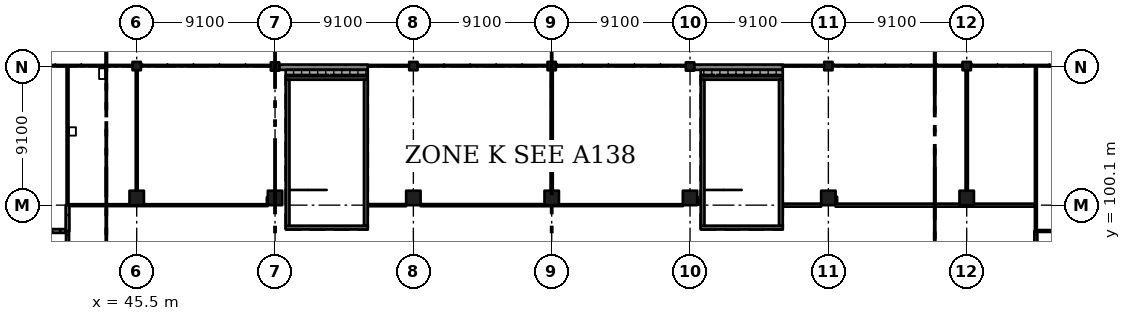
"""IFC4 building model, lengths in metres.
Left out: names, types, materials, properties, quantities, classifications, styles, units other than length and angle.
Written with IfcOpenShell. Run it as: python <this file> out.ifc"""

import sys

from ifc_helpers import new_model, si_unit, direction, frame, frame_2d, origin, origin_2d, place, context, subcontext, project, spatial, rectangle, extrude, element, fill, save


model = new_model("IFC4")
c1 = context("Model", 3, precision=1e-05, world=origin(), true_north=direction((0.0, 1.0)))
c2 = subcontext(c1, "Body", "Model", "MODEL_VIEW")
j1 = project(units=[si_unit("LENGTHUNIT", "METRE"), si_unit("PLANEANGLEUNIT", "RADIAN")], contexts=[c1])
p1 = place(None, origin())
s1 = spatial("IfcSite", under=j1, at=p1, CompositionType="ELEMENT")
p2 = place(p1, origin())
s2 = spatial("IfcBuilding", under=s1, at=p2, CompositionType="ELEMENT")
p3 = place(p2, frame((0.0, 0.0, 10.92)))
s3 = spatial("IfcBuildingStorey", under=s2, at=p3, CompositionType="ELEMENT", Elevation=10.92)
p4 = place(p3, frame((45.5, 100.575, 0.0), z_axis=(0.0, 0.0, 1.0), x_axis=(1.0, 0.0, 0.0)))
e1 = element("IfcColumn", 1, at=p4, inside=s3, PredefinedType="COLUMN", context=c2, shape_type="SweptSolid", body=[
    extrude(rectangle(XDim=0.95, YDim=0.95, at=origin_2d()), origin(), (0.0, 0.0, 1.0), 4.55),
])
p5 = place(p3, frame((45.5, 109.25, 0.0), z_axis=(0.0, 0.0, 1.0), x_axis=(1.0, 0.0, 0.0)))
e2 = element("IfcColumn", 2, at=p5, inside=s3, PredefinedType="COLUMN", context=c2, shape_type="SweptSolid", body=[
    extrude(rectangle(XDim=0.55, YDim=0.55, at=origin_2d()), origin(), (0.0, 0.0, 1.0), 4.55),
])
p6 = place(p3, frame((54.6, 100.575, 0.0), z_axis=(0.0, 0.0, 1.0), x_axis=(1.0, 0.0, 0.0)))
e3 = element("IfcColumn", 3, at=p6, inside=s3, PredefinedType="COLUMN", context=c2, shape_type="SweptSolid", body=[
    extrude(rectangle(XDim=0.95, YDim=0.95, at=origin_2d()), origin(), (0.0, 0.0, 1.0), 4.55),
])
p7 = place(p3, frame((54.6, 109.225, 0.0), z_axis=(0.0, 0.0, 1.0), x_axis=(1.0, 0.0, 0.0)))
e4 = element("IfcColumn", 4, at=p7, inside=s3, PredefinedType="COLUMN", context=c2, shape_type="SweptSolid", body=[
    extrude(rectangle(XDim=0.55, YDim=0.55, at=origin_2d()), origin(), (0.0, 0.0, 1.0), 4.55),
])
p8 = place(p3, frame((63.7, 100.575, 0.0), z_axis=(0.0, 0.0, 1.0), x_axis=(1.0, 0.0, 0.0)))
e5 = element("IfcColumn", 5, at=p8, inside=s3, PredefinedType="COLUMN", context=c2, shape_type="SweptSolid", body=[
    extrude(rectangle(XDim=0.95, YDim=0.95, at=origin_2d()), origin(), (0.0, 0.0, 1.0), 4.55),
])
p9 = place(p3, frame((63.7, 109.25, 0.0), z_axis=(0.0, 0.0, 1.0), x_axis=(1.0, 0.0, 0.0)))
e6 = element("IfcColumn", 6, at=p9, inside=s3, PredefinedType="COLUMN", context=c2, shape_type="SweptSolid", body=[
    extrude(rectangle(XDim=0.55, YDim=0.55, at=origin_2d()), origin(), (0.0, 0.0, 1.0), 4.55),
])
p10 = place(p3, frame((72.8, 100.575, 0.0), z_axis=(0.0, 0.0, 1.0), x_axis=(1.0, 0.0, 0.0)))
e7 = element("IfcColumn", 7, at=p10, inside=s3, PredefinedType="COLUMN", context=c2, shape_type="SweptSolid", body=[
    extrude(rectangle(XDim=0.95, YDim=0.95, at=origin_2d()), origin(), (0.0, 0.0, 1.0), 4.55),
])
p11 = place(p3, frame((72.8, 109.25, 0.0), z_axis=(0.0, 0.0, 1.0), x_axis=(1.0, 0.0, 0.0)))
e8 = element("IfcColumn", 8, at=p11, inside=s3, PredefinedType="COLUMN", context=c2, shape_type="SweptSolid", body=[
    extrude(rectangle(XDim=0.55, YDim=0.55, at=origin_2d()), origin(), (0.0, 0.0, 1.0), 4.55),
])
p12 = place(p3, frame((81.9, 100.575, 0.0), z_axis=(0.0, 0.0, 1.0), x_axis=(1.0, 0.0, 0.0)))
e9 = element("IfcColumn", 9, at=p12, inside=s3, PredefinedType="COLUMN", context=c2, shape_type="SweptSolid", body=[
    extrude(rectangle(XDim=0.95, YDim=0.95, at=origin_2d()), origin(), (0.0, 0.0, 1.0), 4.55),
])
p13 = place(p3, frame((81.9, 109.225, 0.0), z_axis=(0.0, 0.0, 1.0), x_axis=(1.0, 0.0, 0.0)))
e10 = element("IfcColumn", 10, at=p13, inside=s3, PredefinedType="COLUMN", context=c2, shape_type="SweptSolid", body=[
    extrude(rectangle(XDim=0.55, YDim=0.55, at=origin_2d()), origin(), (0.0, 0.0, 1.0), 4.55),
])
p14 = place(p3, frame((91.0, 100.575, 0.0), z_axis=(0.0, 0.0, 1.0), x_axis=(1.0, 0.0, 0.0)))
e11 = element("IfcColumn", 11, at=p14, inside=s3, PredefinedType="COLUMN", context=c2, shape_type="SweptSolid", body=[
    extrude(rectangle(XDim=0.95, YDim=0.95, at=origin_2d()), origin(), (0.0, 0.0, 1.0), 4.55),
])
p15 = place(p3, frame((91.0, 109.25, 0.0), z_axis=(0.0, 0.0, 1.0), x_axis=(1.0, 0.0, 0.0)))
e12 = element("IfcColumn", 12, at=p15, inside=s3, PredefinedType="COLUMN", context=c2, shape_type="SweptSolid", body=[
    extrude(rectangle(XDim=0.55, YDim=0.55, at=origin_2d()), origin(), (0.0, 0.0, 1.0), 4.55),
])
p16 = place(p3, frame((100.1, 100.575, 0.0), z_axis=(0.0, 0.0, 1.0), x_axis=(1.0, 0.0, 0.0)))
e13 = element("IfcColumn", 13, at=p16, inside=s3, PredefinedType="COLUMN", context=c2, shape_type="SweptSolid", body=[
    extrude(rectangle(XDim=0.95, YDim=0.95, at=origin_2d()), origin(), (0.0, 0.0, 1.0), 4.55),
])
p17 = place(p3, frame((100.1, 109.25, 0.0), z_axis=(0.0, 0.0, 1.0), x_axis=(1.0, 0.0, 0.0)))
e14 = element("IfcColumn", 14, at=p17, inside=s3, PredefinedType="COLUMN", context=c2, shape_type="SweptSolid", body=[
    extrude(rectangle(XDim=0.55, YDim=0.55, at=origin_2d()), origin(), (0.0, 0.0, 1.0), 4.55),
])
p18 = place(p3, frame((60.7, 98.625, 0.0), z_axis=(0.0, 0.0, 1.0), x_axis=(-1.0, 0.0, 0.0)))
e15 = element("IfcWall", 15, at=p18, inside=s3, PredefinedType="SHEAR", context=c2, shape_type="SweptSolid", body=[
    extrude(rectangle(XDim=5.4, YDim=0.25, at=frame_2d((2.7, 0.0))), origin(), (0.0, 0.0, 1.0), 4.55),
])
p19 = place(p18, frame((1.5, 0.0, 0.0)))
e16 = element("IfcOpeningElement", 16, at=p19, cuts=e15, PredefinedType="OPENING", context=c2, shape_type="SweptSolid", body=[
    extrude(rectangle(XDim=2.4, YDim=2.1, at=frame_2d((1.2, 1.05))), frame((0.0, 0.135, 0.0), z_axis=(0.0, -1.0, 0.0), x_axis=(1.0, 0.0, 0.0)), (0.0, 0.0, 1.0), 0.27),
])
p20 = place(p3, frame((60.7, 108.475, 0.0), z_axis=(0.0, 0.0, 1.0), x_axis=(-1.0, 0.0, 0.0)))
e17 = element("IfcWall", 17, at=p20, inside=s3, PredefinedType="SHEAR", context=c2, shape_type="SweptSolid", body=[
    extrude(rectangle(XDim=5.4, YDim=0.25, at=frame_2d((2.7, 0.0))), origin(), (0.0, 0.0, 1.0), 4.55),
])
for number, where, z_axis, x_axis in (
    (18, (55.425, 108.35, 0.0), (0.0, 0.0, 1.0), (0.0, -1.0, 0.0)),
    (19, (60.575, 108.35, 0.0), (0.0, 0.0, 1.0), (0.0, -1.0, 0.0)),
):
    element("IfcWall", number, at=place(p3, frame(where, z_axis=z_axis, x_axis=x_axis)), inside=s3, PredefinedType="SHEAR", context=c2, shape_type="SweptSolid", body=[
        extrude(rectangle(XDim=9.6, YDim=0.25, at=frame_2d((4.8, 0.0))), origin(), (0.0, 0.0, 1.0), 4.55),
    ])
p21 = place(p3, frame((88.0, 98.625, 0.0), z_axis=(0.0, 0.0, 1.0), x_axis=(-1.0, 0.0, 0.0)))
e20 = element("IfcWall", 20, at=p21, inside=s3, PredefinedType="SHEAR", context=c2, shape_type="SweptSolid", body=[
    extrude(rectangle(XDim=5.4, YDim=0.25, at=frame_2d((2.7, 0.0))), origin(), (0.0, 0.0, 1.0), 4.55),
])
p22 = place(p21, frame((1.5, 0.0, 0.0)))
e21 = element("IfcOpeningElement", 21, at=p22, cuts=e20, PredefinedType="OPENING", context=c2, shape_type="SweptSolid", body=[
    extrude(rectangle(XDim=2.4, YDim=2.1, at=frame_2d((1.2, 1.05))), frame((0.0, 0.135, 0.0), z_axis=(0.0, -1.0, 0.0), x_axis=(1.0, 0.0, 0.0)), (0.0, 0.0, 1.0), 0.27),
])
p23 = place(p3, frame((88.0, 108.475, 0.0), z_axis=(0.0, 0.0, 1.0), x_axis=(-1.0, 0.0, 0.0)))
e22 = element("IfcWall", 22, at=p23, inside=s3, PredefinedType="SHEAR", context=c2, shape_type="SweptSolid", body=[
    extrude(rectangle(XDim=5.4, YDim=0.25, at=frame_2d((2.7, 0.0))), origin(), (0.0, 0.0, 1.0), 4.55),
])
for number, where, z_axis, x_axis in (
    (23, (82.725, 108.35, 0.0), (0.0, 0.0, 1.0), (0.0, -1.0, 0.0)),
    (24, (87.875, 108.35, 0.0), (0.0, 0.0, 1.0), (0.0, -1.0, 0.0)),
):
    element("IfcWall", number, at=place(p3, frame(where, z_axis=z_axis, x_axis=x_axis)), inside=s3, PredefinedType="SHEAR", context=c2, shape_type="SweptSolid", body=[
        extrude(rectangle(XDim=9.6, YDim=0.25, at=frame_2d((4.8, 0.0))), origin(), (0.0, 0.0, 1.0), 4.55),
    ])
for number, where, z_axis, x_axis in (
    (25, (88.0, 109.175, 0.0), (0.0, 0.0, 1.0), (-1.0, 0.0, 0.0)),
    (26, (60.7, 109.175, 0.0), (0.0, 0.0, 1.0), (-1.0, 0.0, 0.0)),
):
    element("IfcWall", number, at=place(p3, frame(where, z_axis=z_axis, x_axis=x_axis)), inside=s3, PredefinedType="SOLIDWALL", context=c2, shape_type="SweptSolid", body=[
        extrude(rectangle(XDim=5.825, YDim=0.35, at=frame_2d((2.913, 0.0))), origin(), (0.0, 0.0, 1.0), 3.5),
    ])
for number, where, z_axis, x_axis in (
    (27, (55.3, 108.8, 0.0), (0.0, 0.0, 1.0), (1.0, 0.0, 0.0)),
    (28, (82.6, 108.8, 0.0), (0.0, 0.0, 1.0), (1.0, 0.0, 0.0)),
):
    element("IfcWall", number, at=place(p3, frame(where, z_axis=z_axis, x_axis=x_axis)), inside=s3, PredefinedType="SOLIDWALL", context=c2, shape_type="SweptSolid", body=[
        extrude(rectangle(XDim=5.4, YDim=0.4, at=frame_2d((2.7, 0.0))), origin(), (0.0, 0.0, 1.0), 4.25),
    ])
p24 = place(p3, frame((36.775, 98.4, 0.0), z_axis=(0.0, 0.0, 1.0), x_axis=(1.0, 0.0, 0.0)))
e29 = element("IfcWall", 29, at=p24, inside=s3, PredefinedType="SOLIDWALL", context=c2, shape_type="SweptSolid", body=[
    extrude(rectangle(XDim=4.05, YDim=0.25, at=frame_2d((2.025, 0.0))), origin(), (0.0, 0.0, 1.0), 4.25),
])
p25 = place(p24, frame((1.15, 0.0, 0.0)))
e30 = element("IfcOpeningElement", 30, at=p25, cuts=e29, PredefinedType="OPENING", context=c2, shape_type="SweptSolid", body=[
    extrude(rectangle(XDim=1.8, YDim=2.1, at=frame_2d((0.9, 1.05))), frame((0.0, 0.135, 0.0), z_axis=(0.0, -1.0, 0.0), x_axis=(1.0, 0.0, 0.0)), (0.0, 0.0, 1.0), 0.27),
])
p26 = place(p3, frame((40.95, 98.4, 0.0), z_axis=(0.0, 0.0, 1.0), x_axis=(0.0, -1.0, 0.0)))
e31 = element("IfcWall", 31, at=p26, inside=s3, PredefinedType="PARTITIONING", context=c2, shape_type="SweptSolid", body=[
    extrude(rectangle(XDim=7.37, YDim=0.2, at=frame_2d((3.685, 0.0))), origin(), (0.0, 0.0, 1.0), 4.25),
])
p27 = place(p26, frame((0.95, 0.0, 0.0)))
e32 = element("IfcOpeningElement", 32, at=p27, cuts=e31, PredefinedType="OPENING", context=c2, shape_type="SweptSolid", body=[
    extrude(rectangle(XDim=1.8, YDim=2.4, at=frame_2d((0.9, 1.2))), frame((0.0, 0.11, 0.0), z_axis=(0.0, -1.0, 0.0), x_axis=(1.0, 0.0, 0.0)), (0.0, 0.0, 1.0), 0.22),
])
p28 = place(p26, frame((4.65, 0.0, 0.0)))
e33 = element("IfcOpeningElement", 33, at=p28, cuts=e31, PredefinedType="OPENING", context=c2, shape_type="SweptSolid", body=[
    extrude(rectangle(XDim=1.8, YDim=2.4, at=frame_2d((0.9, 1.2))), frame((0.0, 0.11, 0.0), z_axis=(0.0, -1.0, 0.0), x_axis=(1.0, 0.0, 0.0)), (0.0, 0.0, 1.0), 0.22),
])
p29 = place(p3, frame((40.95, 100.1, 0.0), z_axis=(0.0, 0.0, 1.0), x_axis=(0.0, -1.0, 0.0)))
e34 = element("IfcWall", 34, at=p29, inside=s3, PredefinedType="SOLIDWALL", context=c2, shape_type="SweptSolid", body=[
    extrude(rectangle(XDim=1.7, YDim=0.25, at=frame_2d((0.85, 0.0))), origin(), (0.0, 0.0, 1.0), 4.25),
])
p30 = place(p3, frame((40.95, 100.1, 0.0), z_axis=(0.0, 0.0, 1.0), x_axis=(0.0, 1.0, 0.0)))
e35 = element("IfcWall", 35, at=p30, inside=s3, PredefinedType="PARTITIONING", context=c2, shape_type="SweptSolid", body=[
    extrude(rectangle(XDim=9.07, YDim=0.125, at=frame_2d((4.535, 0.0))), origin(), (0.0, 0.0, 1.0), 4.25),
])
p31 = place(p3, frame((41.075, 100.1, 0.0), z_axis=(0.0, 0.0, 1.0), x_axis=(1.0, 0.0, 0.0)))
e36 = element("IfcWall", 36, at=p31, inside=s3, PredefinedType="PARTITIONING", context=c2, shape_type="SweptSolid", body=[
    extrude(rectangle(XDim=4.425, YDim=0.125, at=frame_2d((2.212, 0.0))), origin(), (0.0, 0.0, 1.0), 3.55),
])
p32 = place(p31, frame((1.75, 0.0, 0.0)))
e37 = element("IfcOpeningElement", 37, at=p32, cuts=e36, PredefinedType="OPENING", context=c2, shape_type="SweptSolid", body=[
    extrude(rectangle(XDim=1.0, YDim=2.1, at=frame_2d((0.5, 1.05))), frame((0.0, 0.073, 0.0), z_axis=(0.0, -1.0, 0.0), x_axis=(1.0, 0.0, 0.0)), (0.0, 0.0, 1.0), 0.145),
])
p33 = place(p3, frame((45.5, 100.1, 0.0), z_axis=(0.0, 0.0, 1.0), x_axis=(1.0, 0.0, 0.0)))
e38 = element("IfcWall", 38, at=p33, inside=s3, PredefinedType="PARTITIONING", context=c2, shape_type="SweptSolid", body=[
    extrude(rectangle(XDim=8.625, YDim=0.125, at=frame_2d((4.312, 0.0))), origin(), (0.0, 0.0, 1.0), 3.55),
])
p34 = place(p33, frame((3.85, 0.0, 0.0)))
e39 = element("IfcOpeningElement", 39, at=p34, cuts=e38, PredefinedType="OPENING", context=c2, shape_type="SweptSolid", body=[
    extrude(rectangle(XDim=0.9, YDim=2.1, at=frame_2d((0.45, 1.05))), frame((0.0, 0.073, 0.0), z_axis=(0.0, -1.0, 0.0), x_axis=(1.0, 0.0, 0.0)), (0.0, 0.0, 1.0), 0.145),
])
p35 = place(p3, frame((45.5, 108.975, 0.0), z_axis=(0.0, 0.0, 1.0), x_axis=(0.0, -1.0, 0.0)))
e40 = element("IfcWall", 40, at=p35, inside=s3, PredefinedType="PARTITIONING", context=c2, shape_type="SweptSolid", body=[
    extrude(rectangle(XDim=7.925, YDim=0.125, at=frame_2d((3.962, 0.0))), origin(), (0.0, 0.0, 1.0), 3.55),
])
p36 = place(p3, frame((54.125, 100.15, 0.0), z_axis=(0.0, 0.0, 1.0), x_axis=(0.0, 1.0, 0.0)))
e41 = element("IfcWall", 41, at=p36, inside=s3, PredefinedType="PARTITIONING", context=c2, shape_type="SweptSolid", body=[
    extrude(rectangle(XDim=0.475, YDim=0.125, at=frame_2d((0.238, 0.0))), origin(), (0.0, 0.0, 1.0), 4.25),
])
p37 = place(p3, frame((60.73, 100.1, 0.0), z_axis=(0.0, 0.0, 1.0), x_axis=(1.0, 0.0, 0.0)))
e42 = element("IfcWall", 42, at=p37, inside=s3, PredefinedType="SOLIDWALL", context=c2, shape_type="SweptSolid", body=[
    extrude(rectangle(XDim=2.495, YDim=0.14, at=frame_2d((1.248, 0.0))), origin(), (0.0, 0.0, 1.0), 3.55),
])
p38 = place(p3, frame((64.175, 100.1, 0.0), z_axis=(0.0, 0.0, 1.0), x_axis=(1.0, 0.0, 0.0)))
e43 = element("IfcWall", 43, at=p38, inside=s3, PredefinedType="SOLIDWALL", context=c2, shape_type="SweptSolid", body=[
    extrude(rectangle(XDim=8.625, YDim=0.14, at=frame_2d((4.312, 0.0))), origin(), (0.0, 0.0, 1.0), 3.55),
])
p39 = place(p38, frame((3.55, 0.0, 0.0)))
e44 = element("IfcOpeningElement", 44, at=p39, cuts=e43, PredefinedType="OPENING", context=c2, shape_type="SweptSolid", body=[
    extrude(rectangle(XDim=1.5, YDim=2.1, at=frame_2d((0.75, 1.05))), frame((0.0, 0.08, 0.0), z_axis=(0.0, -1.0, 0.0), x_axis=(1.0, 0.0, 0.0)), (0.0, 0.0, 1.0), 0.16),
])
p40 = place(p3, frame((72.8, 100.1, 0.0), z_axis=(0.0, 0.0, 1.0), x_axis=(1.0, 0.0, 0.0)))
e45 = element("IfcWall", 45, at=p40, inside=s3, PredefinedType="PARTITIONING", context=c2, shape_type="SweptSolid", body=[
    extrude(rectangle(XDim=8.625, YDim=0.125, at=frame_2d((4.312, 0.0))), origin(), (0.0, 0.0, 1.0), 3.55),
])
p41 = place(p40, frame((3.85, 0.0, 0.0)))
e46 = element("IfcOpeningElement", 46, at=p41, cuts=e45, PredefinedType="OPENING", context=c2, shape_type="SweptSolid", body=[
    extrude(rectangle(XDim=0.9, YDim=2.1, at=frame_2d((0.45, 1.05))), frame((0.0, 0.073, 0.0), z_axis=(0.0, -1.0, 0.0), x_axis=(1.0, 0.0, 0.0)), (0.0, 0.0, 1.0), 0.145),
])
p42 = place(p3, frame((72.8, 108.975, 0.0), z_axis=(0.0, 0.0, 1.0), x_axis=(0.0, -1.0, 0.0)))
e47 = element("IfcWall", 47, at=p42, inside=s3, PredefinedType="SOLIDWALL", context=c2, shape_type="SweptSolid", body=[
    extrude(rectangle(XDim=7.925, YDim=0.14, at=frame_2d((3.962, 0.0))), origin(), (0.0, 0.0, 1.0), 3.55),
])
p43 = place(p3, frame((82.375, 100.625, 0.0), z_axis=(0.0, 0.0, 1.0), x_axis=(0.0, -1.0, 0.0)))
e48 = element("IfcWall", 48, at=p43, inside=s3, PredefinedType="PARTITIONING", context=c2, shape_type="SweptSolid", body=[
    extrude(rectangle(XDim=0.475, YDim=0.125, at=frame_2d((0.238, 0.0))), origin(), (0.0, 0.0, 1.0), 4.25),
])
p44 = place(p3, frame((88.03, 100.1, 0.0), z_axis=(0.0, 0.0, 1.0), x_axis=(1.0, 0.0, 0.0)))
e49 = element("IfcWall", 49, at=p44, inside=s3, PredefinedType="PARTITIONING", context=c2, shape_type="SweptSolid", body=[
    extrude(rectangle(XDim=2.495, YDim=0.2, at=frame_2d((1.248, 0.0))), origin(), (0.0, 0.0, 1.0), 3.55),
])
p45 = place(p3, frame((91.475, 100.1, 0.0), z_axis=(0.0, 0.0, 1.0), x_axis=(1.0, 0.0, 0.0)))
e50 = element("IfcWall", 50, at=p45, inside=s3, PredefinedType="PARTITIONING", context=c2, shape_type="SweptSolid", body=[
    extrude(rectangle(XDim=8.625, YDim=0.2, at=frame_2d((4.312, 0.0))), origin(), (0.0, 0.0, 1.0), 3.55),
])
p46 = place(p45, frame((3.35, 0.0, 0.0)))
e51 = element("IfcOpeningElement", 51, at=p46, cuts=e50, PredefinedType="OPENING", context=c2, shape_type="SweptSolid", body=[
    extrude(rectangle(XDim=2.0, YDim=2.4, at=frame_2d((1.0, 1.2))), frame((0.0, 0.11, 0.0), z_axis=(0.0, -1.0, 0.0), x_axis=(1.0, 0.0, 0.0)), (0.0, 0.0, 1.0), 0.22),
])
p47 = place(p3, frame((91.475, 100.65, 0.0), z_axis=(0.0, 0.0, 1.0), x_axis=(0.0, -1.0, 0.0)))
e52 = element("IfcWall", 52, at=p47, inside=s3, PredefinedType="PARTITIONING", context=c2, shape_type="SweptSolid", body=[
    extrude(rectangle(XDim=0.475, YDim=0.2, at=frame_2d((0.237, 0.0))), origin(), (0.0, 0.0, 1.0), 4.25),
])
p48 = place(p3, frame((100.1, 100.1, 0.0), z_axis=(0.0, 0.0, 1.0), x_axis=(1.0, 0.0, 0.0)))
e53 = element("IfcWall", 53, at=p48, inside=s3, PredefinedType="PARTITIONING", context=c2, shape_type="SweptSolid", body=[
    extrude(rectangle(XDim=4.487, YDim=0.2, at=frame_2d((2.244, 0.0))), origin(), (0.0, 0.0, 1.0), 3.55),
])
p49 = place(p48, frame((1.75, 0.0, 0.0)))
e54 = element("IfcOpeningElement", 54, at=p49, cuts=e53, PredefinedType="OPENING", context=c2, shape_type="SweptSolid", body=[
    extrude(rectangle(XDim=1.0, YDim=2.1, at=frame_2d((0.5, 1.05))), frame((0.0, 0.11, 0.0), z_axis=(0.0, -1.0, 0.0), x_axis=(1.0, 0.0, 0.0)), (0.0, 0.0, 1.0), 0.22),
])
p50 = place(p3, frame((100.1, 108.975, 0.0), z_axis=(0.0, 0.0, 1.0), x_axis=(0.0, -1.0, 0.0)))
e55 = element("IfcWall", 55, at=p50, inside=s3, PredefinedType="PARTITIONING", context=c2, shape_type="SweptSolid", body=[
    extrude(rectangle(XDim=7.925, YDim=0.15, at=frame_2d((3.962, 0.0))), origin(), (0.0, 0.0, 1.0), 3.55),
])
p51 = place(p3, frame((104.65, 91.03, 0.0), z_axis=(0.0, 0.0, 1.0), x_axis=(0.0, 1.0, 0.0)))
e56 = element("IfcWall", 56, at=p51, inside=s3, PredefinedType="PARTITIONING", context=c2, shape_type="SweptSolid", body=[
    extrude(rectangle(XDim=7.37, YDim=0.2, at=frame_2d((3.685, 0.0))), origin(), (0.0, 0.0, 1.0), 4.25),
])
p52 = place(p51, frame((0.95, 0.0, 0.0)))
e57 = element("IfcOpeningElement", 57, at=p52, cuts=e56, PredefinedType="OPENING", context=c2, shape_type="SweptSolid", body=[
    extrude(rectangle(XDim=1.8, YDim=2.4, at=frame_2d((0.9, 1.2))), frame((0.0, 0.11, 0.0), z_axis=(0.0, -1.0, 0.0), x_axis=(1.0, 0.0, 0.0)), (0.0, 0.0, 1.0), 0.22),
])
p53 = place(p51, frame((4.65, 0.0, 0.0)))
e58 = element("IfcOpeningElement", 58, at=p53, cuts=e56, PredefinedType="OPENING", context=c2, shape_type="SweptSolid", body=[
    extrude(rectangle(XDim=1.8, YDim=2.4, at=frame_2d((0.9, 1.2))), frame((0.0, 0.11, 0.0), z_axis=(0.0, -1.0, 0.0), x_axis=(1.0, 0.0, 0.0)), (0.0, 0.0, 1.0), 0.22),
])
p54 = place(p3, frame((104.65, 98.4, 0.0), z_axis=(0.0, 0.0, 1.0), x_axis=(0.0, 1.0, 0.0)))
e59 = element("IfcWall", 59, at=p54, inside=s3, PredefinedType="PARTITIONING", context=c2, shape_type="SweptSolid", body=[
    extrude(rectangle(XDim=10.77, YDim=0.125, at=frame_2d((5.385, 0.0))), origin(), (0.0, 0.0, 1.0), 4.25),
])
p55 = place(p3, frame((104.75, 98.4, 0.0), z_axis=(0.0, 0.0, 1.0), x_axis=(1.0, 0.0, 0.0)))
e60 = element("IfcWall", 60, at=p55, inside=s3, PredefinedType="PARTITIONING", context=c2, shape_type="SweptSolid", body=[
    extrude(rectangle(XDim=4.075, YDim=0.125, at=frame_2d((2.038, 0.0))), origin(), (0.0, 0.0, 1.0), 4.25),
])
p56 = place(p55, frame((1.55, 0.0, 0.0)))
e61 = element("IfcOpeningElement", 61, at=p56, cuts=e60, PredefinedType="OPENING", context=c2, shape_type="SweptSolid", body=[
    extrude(rectangle(XDim=0.9, YDim=2.1, at=frame_2d((0.45, 1.05))), frame((0.0, 0.073, 0.0), z_axis=(0.0, -1.0, 0.0), x_axis=(1.0, 0.0, 0.0)), (0.0, 0.0, 1.0), 0.145),
])
p57 = place(p32, origin())
e62 = element("IfcDoor", 62, at=p57, inside=s3, OperationType="SINGLE_SWING_LEFT", PredefinedType="DOOR", context=c2, shape_type="SweptSolid", body=[
    extrude(rectangle(XDim=1.0, YDim=2.1, at=frame_2d((0.5, 1.05))), frame((0.0, 0.025, 0.0), z_axis=(0.0, -1.0, 0.0), x_axis=(1.0, 0.0, 0.0)), (0.0, 0.0, 1.0), 0.05),
])
fill(e37, e62)
p58 = place(p34, origin())
e63 = element("IfcDoor", 63, at=p58, inside=s3, OperationType="SINGLE_SWING_RIGHT", PredefinedType="DOOR", context=c2, shape_type="SweptSolid", body=[
    extrude(rectangle(XDim=0.9, YDim=2.1, at=frame_2d((0.45, 1.05))), frame((0.0, 0.025, 0.0), z_axis=(0.0, -1.0, 0.0), x_axis=(1.0, 0.0, 0.0)), (0.0, 0.0, 1.0), 0.05),
])
fill(e39, e63)
p59 = place(p39, origin())
e64 = element("IfcDoor", 64, at=p59, inside=s3, OperationType="DOUBLE_DOOR_SINGLE_SWING", PredefinedType="DOOR", context=c2, shape_type="SweptSolid", body=[
    extrude(rectangle(XDim=1.5, YDim=2.1, at=frame_2d((0.75, 1.05))), frame((0.0, 0.025, 0.0), z_axis=(0.0, -1.0, 0.0), x_axis=(1.0, 0.0, 0.0)), (0.0, 0.0, 1.0), 0.05),
])
fill(e44, e64)
p60 = place(p41, origin())
e65 = element("IfcDoor", 65, at=p60, inside=s3, OperationType="SINGLE_SWING_RIGHT", PredefinedType="DOOR", context=c2, shape_type="SweptSolid", body=[
    extrude(rectangle(XDim=0.9, YDim=2.1, at=frame_2d((0.45, 1.05))), frame((0.0, 0.025, 0.0), z_axis=(0.0, -1.0, 0.0), x_axis=(1.0, 0.0, 0.0)), (0.0, 0.0, 1.0), 0.05),
])
fill(e46, e65)
p61 = place(p46, origin())
e66 = element("IfcDoor", 66, at=p61, inside=s3, OperationType="DOUBLE_DOOR_SINGLE_SWING", PredefinedType="DOOR", context=c2, shape_type="SweptSolid", body=[
    extrude(rectangle(XDim=2.0, YDim=2.4, at=frame_2d((1.0, 1.2))), frame((0.0, 0.025, 0.0), z_axis=(0.0, -1.0, 0.0), x_axis=(1.0, 0.0, 0.0)), (0.0, 0.0, 1.0), 0.05),
])
fill(e51, e66)
p62 = place(p49, origin())
e67 = element("IfcDoor", 67, at=p62, inside=s3, OperationType="SINGLE_SWING_LEFT", PredefinedType="DOOR", context=c2, shape_type="SweptSolid", body=[
    extrude(rectangle(XDim=1.0, YDim=2.1, at=frame_2d((0.5, 1.05))), frame((0.0, 0.025, 0.0), z_axis=(0.0, -1.0, 0.0), x_axis=(1.0, 0.0, 0.0)), (0.0, 0.0, 1.0), 0.05),
])
fill(e54, e67)
p63 = place(p19, origin())
e68 = element("IfcDoor", 68, at=p63, inside=s3, OperationType="DOUBLE_DOOR_SINGLE_SWING", PredefinedType="DOOR", context=c2, shape_type="SweptSolid", body=[
    extrude(rectangle(XDim=2.4, YDim=2.1, at=frame_2d((1.2, 1.05))), frame((0.0, 0.025, 0.0), z_axis=(0.0, -1.0, 0.0), x_axis=(1.0, 0.0, 0.0)), (0.0, 0.0, 1.0), 0.05),
])
fill(e16, e68)
p64 = place(p22, origin())
e69 = element("IfcDoor", 69, at=p64, inside=s3, OperationType="DOUBLE_DOOR_SINGLE_SWING", PredefinedType="DOOR", context=c2, shape_type="SweptSolid", body=[
    extrude(rectangle(XDim=2.4, YDim=2.1, at=frame_2d((1.2, 1.05))), frame((0.0, 0.025, 0.0), z_axis=(0.0, -1.0, 0.0), x_axis=(1.0, 0.0, 0.0)), (0.0, 0.0, 1.0), 0.05),
])
fill(e21, e69)
save(model, sys.argv[1])
